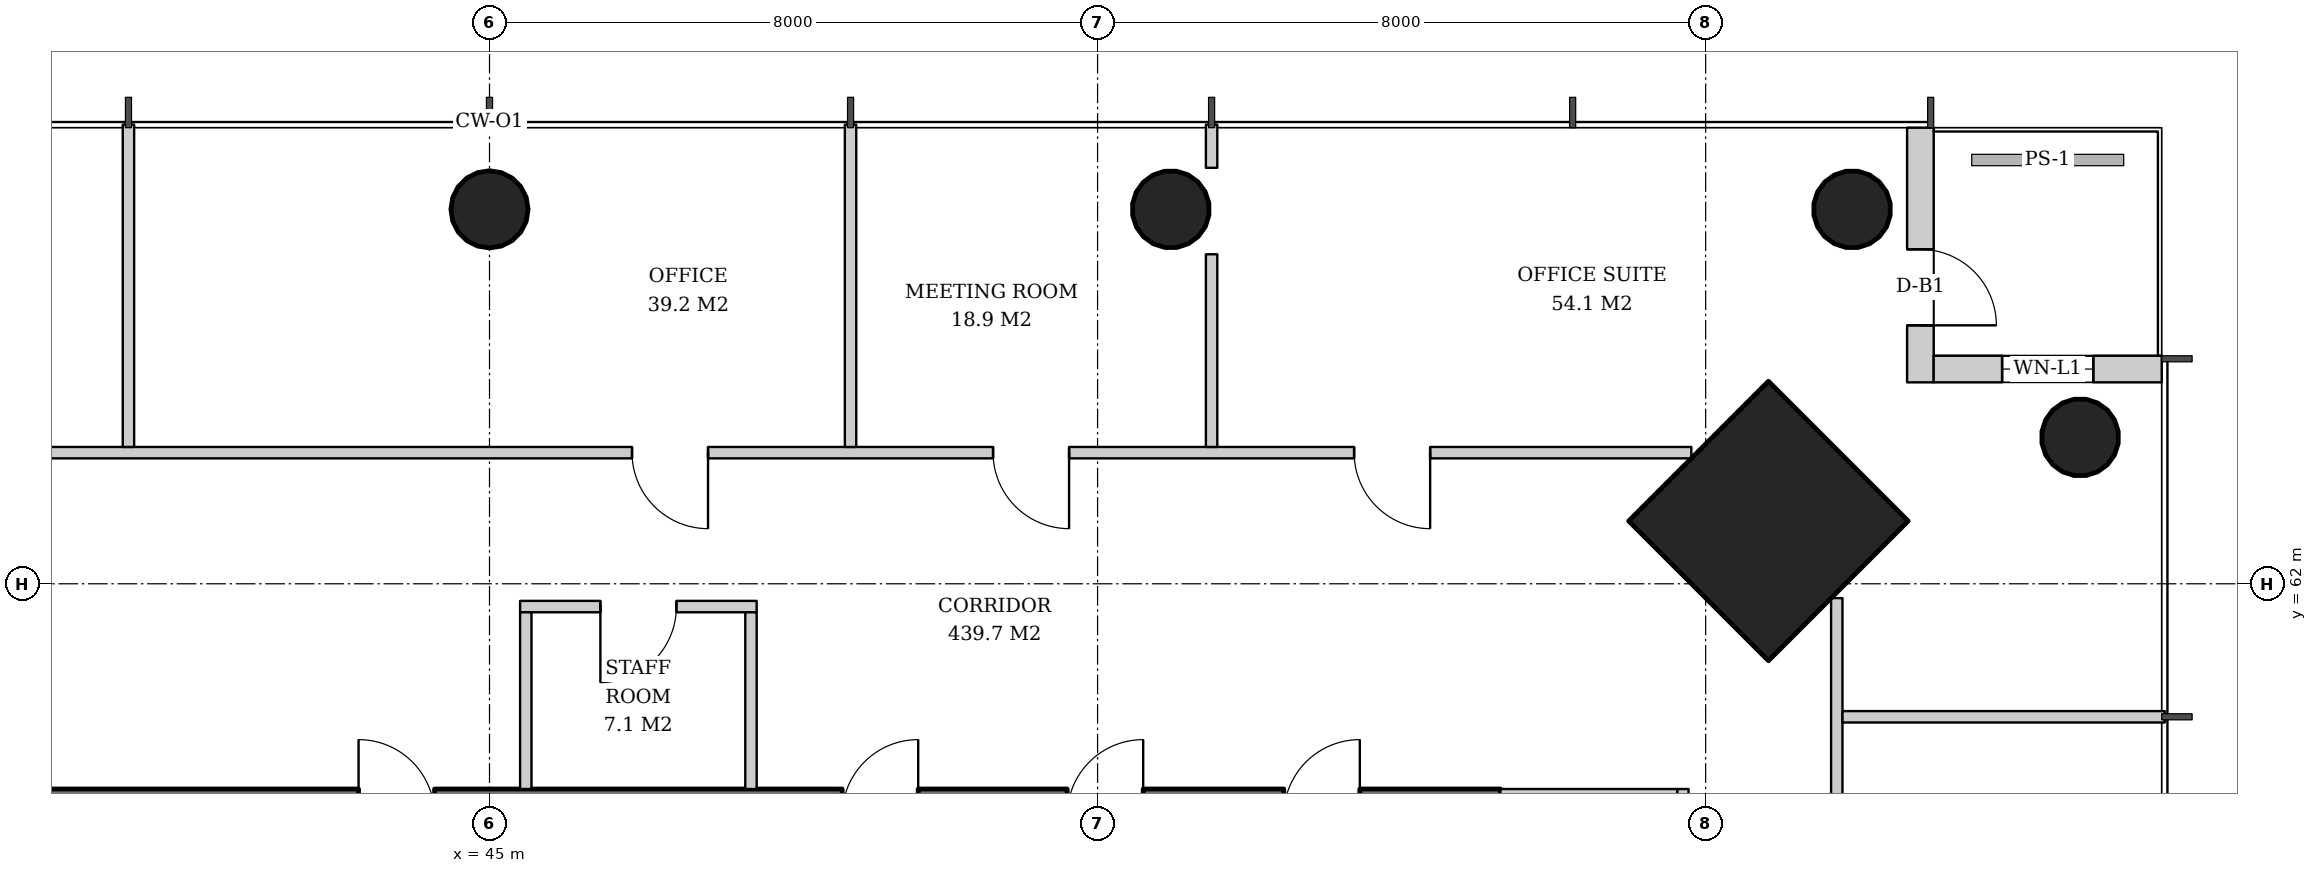
"""IFC4 building model, lengths in metres.
Left out: names, types, materials, properties, quantities, classifications, styles, units other than length and angle.
Written with IfcOpenShell. Run it as: python <this file> out.ifc"""

import sys

from ifc_helpers import new_model, si_unit, direction, frame, frame_2d, origin, origin_2d, place, context, subcontext, project, spatial, rectangle, hollow_circle, extrude, element, fill, save


model = new_model("IFC4")
c1 = context("Model", 3, precision=1e-05, world=origin(), true_north=direction((0.0, 1.0)))
c2 = subcontext(c1, "Body", "Model", "MODEL_VIEW")
j1 = project(units=[si_unit("LENGTHUNIT", "METRE"), si_unit("PLANEANGLEUNIT", "RADIAN")], contexts=[c1])
p1 = place(None, origin())
s1 = spatial("IfcSite", under=j1, at=p1, CompositionType="ELEMENT")
p2 = place(p1, origin())
s2 = spatial("IfcBuilding", under=s1, at=p2, CompositionType="ELEMENT")
p3 = place(p2, frame((0.0, 0.0, 116.0)))
s3 = spatial("IfcBuildingStorey", under=s2, at=p3, CompositionType="ELEMENT", Elevation=116.0)
p4 = place(p3, frame((61.864, 62.864, 0.0), z_axis=(-0.031898107953, -0.031898107953, 0.998981992539), x_axis=(0.707106781187, -0.707106781187, 0.0)))
e1 = element("IfcColumn", 1, at=p4, inside=s3, PredefinedType="COLUMN", context=c2, shape_type="SweptSolid", body=[
    extrude(rectangle(XDim=2.6, YDim=2.6, at=origin_2d()), origin(), (0.0, 0.0, 1.0), 3.804),
])
for number, where, z_axis, x_axis in (
    (2, (65.964, 63.964, 0.0), (-0.032, -0.032, 0.999), (0.707, -0.707, 0.0)),
    (3, (62.964, 66.964, 0.0), (-0.032, -0.032, 0.999), (0.707, -0.707, 0.0)),
):
    element("IfcColumn", number, at=place(p3, frame(where, z_axis=z_axis, x_axis=x_axis)), inside=s3, PredefinedType="COLUMN", context=c2, shape_type="SweptSolid", body=[
        extrude(hollow_circle(Radius=0.508, WallThickness=0.04, at=origin_2d()), origin(), (0.0, 0.0, 1.0), 3.804),
    ])
p5 = place(p3, frame((53.982, 66.964, 0.0), z_axis=(-0.015987204877, -0.031974409754, 0.999360818924), x_axis=(0.894427191, -0.4472135955, 0.0)))
e4 = element("IfcColumn", 4, at=p5, inside=s3, PredefinedType="COLUMN", context=c2, shape_type="SweptSolid", body=[
    extrude(hollow_circle(Radius=0.508, WallThickness=0.04, at=origin_2d()), origin(), (0.0, 0.0, 1.0), 3.802),
])
p6 = place(p3, frame((45.0, 66.964, 0.0), z_axis=(0.0, -0.031978496719, 0.999488557087), x_axis=(1.0, 0.0, 0.0)))
e5 = element("IfcColumn", 5, at=p6, inside=s3, PredefinedType="COLUMN", context=c2, shape_type="SweptSolid", body=[
    extrude(hollow_circle(Radius=0.508, WallThickness=0.04, at=origin_2d()), origin(), (0.0, 0.0, 1.0), 3.802),
])
p7 = place(p3, frame((31.7, 58.95, 0.0), z_axis=(0.0, 0.0, 1.0), x_axis=(1.0, 0.0, 0.0)))
e6 = element("IfcWall", 6, at=p7, inside=s3, PredefinedType="SHEAR", context=c2, shape_type="SweptSolid", body=[
    extrude(rectangle(XDim=26.6, YDim=0.7, at=frame_2d((13.3, 0.0))), origin(), (0.0, 0.0, 1.0), 3.8),
])
p8 = place(p7, frame((17.94, 0.0, 0.0)))
e7 = element("IfcOpeningElement", 7, at=p8, cuts=e6, PredefinedType="OPENING", context=c2, shape_type="SweptSolid", body=[
    extrude(rectangle(XDim=1.0, YDim=2.1, at=frame_2d((0.5, 1.05))), frame((0.0, 0.36, 0.0), z_axis=(0.0, -1.0, 0.0), x_axis=(1.0, 0.0, 0.0)), (0.0, 0.0, 1.0), 0.72),
])
p9 = place(p7, frame((5.825, 0.0, 0.0)))
e8 = element("IfcOpeningElement", 8, at=p9, cuts=e6, PredefinedType="OPENING", context=c2, shape_type="SweptSolid", body=[
    extrude(rectangle(XDim=1.0, YDim=2.1, at=frame_2d((0.5, 1.05))), frame((0.0, 0.36, 0.0), z_axis=(0.0, -1.0, 0.0), x_axis=(1.0, 0.0, 0.0)), (0.0, 0.0, 1.0), 0.72),
])
p10 = place(p7, frame((1.551, 0.0, 0.0)))
e9 = element("IfcOpeningElement", 9, at=p10, cuts=e6, PredefinedType="OPENING", context=c2, shape_type="SweptSolid", body=[
    extrude(rectangle(XDim=1.0, YDim=2.1, at=frame_2d((0.5, 1.05))), frame((0.0, 0.36, 0.0), z_axis=(0.0, -1.0, 0.0), x_axis=(1.0, 0.0, 0.0)), (0.0, 0.0, 1.0), 0.72),
])
p11 = place(p7, frame((3.638, 0.0, 0.0)))
e10 = element("IfcOpeningElement", 10, at=p11, cuts=e6, PredefinedType="OPENING", context=c2, shape_type="SweptSolid", body=[
    extrude(rectangle(XDim=1.0, YDim=2.1, at=frame_2d((0.5, 1.05))), frame((0.0, 0.36, 0.0), z_axis=(0.0, -1.0, 0.0), x_axis=(1.0, 0.0, 0.0)), (0.0, 0.0, 1.0), 0.72),
])
p12 = place(p7, frame((11.577, 0.0, 0.0)))
e11 = element("IfcOpeningElement", 11, at=p12, cuts=e6, PredefinedType="OPENING", context=c2, shape_type="SweptSolid", body=[
    extrude(rectangle(XDim=1.0, YDim=2.1, at=frame_2d((0.5, 1.05))), frame((0.0, 0.36, 0.0), z_axis=(0.0, -1.0, 0.0), x_axis=(1.0, 0.0, 0.0)), (0.0, 0.0, 1.0), 0.72),
])
p13 = place(p7, frame((20.9, 0.0, 0.0)))
e12 = element("IfcOpeningElement", 12, at=p13, cuts=e6, PredefinedType="OPENING", context=c2, shape_type="SweptSolid", body=[
    extrude(rectangle(XDim=1.0, YDim=2.1, at=frame_2d((0.5, 1.05))), frame((0.0, 0.36, 0.0), z_axis=(0.0, -1.0, 0.0), x_axis=(1.0, 0.0, 0.0)), (0.0, 0.0, 1.0), 0.72),
])
p14 = place(p7, frame((23.75, 0.0, 0.0)))
e13 = element("IfcOpeningElement", 13, at=p14, cuts=e6, PredefinedType="OPENING", context=c2, shape_type="SweptSolid", body=[
    extrude(rectangle(XDim=1.0, YDim=2.1, at=frame_2d((0.5, 1.05))), frame((0.0, 0.36, 0.0), z_axis=(0.0, -1.0, 0.0), x_axis=(1.0, 0.0, 0.0)), (0.0, 0.0, 1.0), 0.72),
])
p15 = place(p3, frame((63.825, 68.0, 0.0), z_axis=(0.0, 0.0, 1.0), x_axis=(0.0, -1.0, 0.0)))
e14 = element("IfcWall", 14, at=p15, inside=s3, PredefinedType="SOLIDWALL", context=c2, shape_type="SweptSolid", body=[
    extrude(rectangle(XDim=3.35, YDim=0.35, at=frame_2d((1.675, 0.0))), origin(), (0.0, 0.0, 1.0), 3.62),
])
p16 = place(p15, frame((1.6, 0.0, 0.0)))
e15 = element("IfcOpeningElement", 15, at=p16, cuts=e14, PredefinedType="OPENING", context=c2, shape_type="SweptSolid", body=[
    extrude(rectangle(XDim=1.0, YDim=2.4, at=frame_2d((0.5, 1.2))), frame((0.0, 0.185, 0.0), z_axis=(0.0, -1.0, 0.0), x_axis=(1.0, 0.0, 0.0)), (0.0, 0.0, 1.0), 0.37),
])
p17 = place(p3, frame((64.0, 64.825, 0.0), z_axis=(0.0, 0.0, 1.0), x_axis=(1.0, 0.0, 0.0)))
e16 = element("IfcWall", 16, at=p17, inside=s3, PredefinedType="SOLIDWALL", context=c2, shape_type="SweptSolid", body=[
    extrude(rectangle(XDim=3.0, YDim=0.35, at=frame_2d((1.5, 0.0))), origin(), (0.0, 0.0, 1.0), 3.62),
])
p18 = place(p17, frame((0.9, 0.0, 0.6)))
e17 = element("IfcOpeningElement", 17, at=p18, cuts=e16, PredefinedType="OPENING", context=c2, shape_type="SweptSolid", body=[
    extrude(rectangle(XDim=1.2, YDim=2.55, at=frame_2d((0.6, 1.275))), frame((0.0, 0.185, 0.0), z_axis=(0.0, -1.0, 0.0), x_axis=(1.0, 0.0, 0.0)), (0.0, 0.0, 1.0), 0.37),
])
p19 = place(p3, frame((60.7, 48.025, 0.0), z_axis=(0.0, 0.0, 1.0), x_axis=(0.0, 1.0, 0.0)))
e18 = element("IfcWall", 18, at=p19, inside=s3, PredefinedType="PARTITIONING", context=c2, shape_type="SweptSolid", body=[
    extrude(rectangle(XDim=11.275, YDim=0.15, at=frame_2d((5.638, 0.0))), origin(), (0.0, 0.0, 1.0), 2.806),
])
p20 = place(p19, frame((5.137, 0.0, 0.0)))
e19 = element("IfcOpeningElement", 19, at=p20, cuts=e18, PredefinedType="OPENING", context=c2, shape_type="SweptSolid", body=[
    extrude(rectangle(XDim=1.0, YDim=2.1, at=frame_2d((0.5, 1.05))), frame((0.0, 0.085, 0.0), z_axis=(0.0, -1.0, 0.0), x_axis=(1.0, 0.0, 0.0)), (0.0, 0.0, 1.0), 0.17),
])
p21 = place(p3, frame((58.3, 59.225, 0.0), z_axis=(0.0, 0.0, 1.0), x_axis=(1.0, 0.0, 0.0)))
e20 = element("IfcWall", 20, at=p21, inside=s3, PredefinedType="PARTITIONING", context=c2, shape_type="SweptSolid", body=[
    extrude(rectangle(XDim=2.325, YDim=0.15, at=frame_2d((1.163, 0.0))), origin(), (0.0, 0.0, 1.0), 3.62),
])
p22 = place(p3, frame((48.515, 61.7, 0.0), z_axis=(0.0, 0.0, 1.0), x_axis=(-1.0, 0.0, 0.0)))
e21 = element("IfcWall", 21, at=p22, inside=s3, PredefinedType="PARTITIONING", context=c2, shape_type="SweptSolid", body=[
    extrude(rectangle(XDim=3.112, YDim=0.15, at=frame_2d((1.556, 0.0))), origin(), (0.0, 0.0, 1.0), 2.858),
])
p23 = place(p22, frame((1.056, 0.0, 0.0)))
e22 = element("IfcOpeningElement", 22, at=p23, cuts=e21, PredefinedType="OPENING", context=c2, shape_type="SweptSolid", body=[
    extrude(rectangle(XDim=1.0, YDim=2.1, at=frame_2d((0.5, 1.05))), frame((0.0, 0.085, 0.0), z_axis=(0.0, -1.0, 0.0), x_axis=(1.0, 0.0, 0.0)), (0.0, 0.0, 1.0), 0.17),
])
p24 = place(p3, frame((48.44, 59.3, 0.0), z_axis=(0.0, 0.0, 1.0), x_axis=(0.0, 1.0, 0.0)))
e23 = element("IfcWall", 23, at=p24, inside=s3, PredefinedType="PARTITIONING", context=c2, shape_type="SweptSolid", body=[
    extrude(rectangle(XDim=2.325, YDim=0.15, at=frame_2d((1.163, 0.0))), origin(), (0.0, 0.0, 1.0), 3.62),
])
p25 = place(p3, frame((45.478, 59.3, 0.0), z_axis=(0.0, 0.0, 1.0), x_axis=(0.0, 1.0, 0.0)))
e24 = element("IfcWall", 24, at=p25, inside=s3, PredefinedType="PARTITIONING", context=c2, shape_type="SweptSolid", body=[
    extrude(rectangle(XDim=2.325, YDim=0.15, at=frame_2d((1.163, 0.0))), origin(), (0.0, 0.0, 1.0), 2.858),
])
p26 = place(p3, frame((62.725, 30.188, 0.0), z_axis=(0.0, 0.0, 1.0), x_axis=(0.0, 1.0, 0.0)))
e25 = element("IfcWall", 25, at=p26, inside=s3, PredefinedType="PARTITIONING", context=c2, shape_type="SweptSolid", body=[
    extrude(rectangle(XDim=31.623, YDim=0.15, at=frame_2d((15.812, 0.0))), origin(), (0.0, 0.0, 1.0), 2.72),
])
p27 = place(p26, frame((3.437, 0.0, 0.0)))
e26 = element("IfcOpeningElement", 26, at=p27, cuts=e25, PredefinedType="OPENING", context=c2, shape_type="SweptSolid", body=[
    extrude(rectangle(XDim=1.0, YDim=2.1, at=frame_2d((0.5, 1.05))), frame((0.0, 0.085, 0.0), z_axis=(0.0, -1.0, 0.0), x_axis=(1.0, 0.0, 0.0)), (0.0, 0.0, 1.0), 0.17),
])
p28 = place(p26, frame((8.187, 0.0, 0.0)))
e27 = element("IfcOpeningElement", 27, at=p28, cuts=e25, PredefinedType="OPENING", context=c2, shape_type="SweptSolid", body=[
    extrude(rectangle(XDim=1.0, YDim=2.1, at=frame_2d((0.5, 1.05))), frame((0.0, 0.085, 0.0), z_axis=(0.0, -1.0, 0.0), x_axis=(1.0, 0.0, 0.0)), (0.0, 0.0, 1.0), 0.17),
])
p29 = place(p26, frame((12.937, 0.0, 0.0)))
e28 = element("IfcOpeningElement", 28, at=p29, cuts=e25, PredefinedType="OPENING", context=c2, shape_type="SweptSolid", body=[
    extrude(rectangle(XDim=1.0, YDim=2.1, at=frame_2d((0.5, 1.05))), frame((0.0, 0.085, 0.0), z_axis=(0.0, -1.0, 0.0), x_axis=(1.0, 0.0, 0.0)), (0.0, 0.0, 1.0), 0.17),
])
p30 = place(p26, frame((17.687, 0.0, 0.0)))
e29 = element("IfcOpeningElement", 29, at=p30, cuts=e25, PredefinedType="OPENING", context=c2, shape_type="SweptSolid", body=[
    extrude(rectangle(XDim=1.0, YDim=2.1, at=frame_2d((0.5, 1.05))), frame((0.0, 0.085, 0.0), z_axis=(0.0, -1.0, 0.0), x_axis=(1.0, 0.0, 0.0)), (0.0, 0.0, 1.0), 0.17),
])
p31 = place(p26, frame((22.437, 0.0, 0.0)))
e30 = element("IfcOpeningElement", 30, at=p31, cuts=e25, PredefinedType="OPENING", context=c2, shape_type="SweptSolid", body=[
    extrude(rectangle(XDim=1.0, YDim=2.1, at=frame_2d((0.5, 1.05))), frame((0.0, 0.085, 0.0), z_axis=(0.0, -1.0, 0.0), x_axis=(1.0, 0.0, 0.0)), (0.0, 0.0, 1.0), 0.17),
])
p32 = place(p26, frame((27.187, 0.0, 0.0)))
e31 = element("IfcOpeningElement", 31, at=p32, cuts=e25, PredefinedType="OPENING", context=c2, shape_type="SweptSolid", body=[
    extrude(rectangle(XDim=1.0, YDim=2.1, at=frame_2d((0.5, 1.05))), frame((0.0, 0.085, 0.0), z_axis=(0.0, -1.0, 0.0), x_axis=(1.0, 0.0, 0.0)), (0.0, 0.0, 1.0), 0.17),
])
p33 = place(p3, frame((62.8, 60.25, 0.0), z_axis=(0.0, 0.0, 1.0), x_axis=(1.0, 0.0, 0.0)))
e32 = element("IfcWall", 32, at=p33, inside=s3, PredefinedType="PARTITIONING", context=c2, shape_type="SweptSolid", body=[
    extrude(rectangle(XDim=4.24, YDim=0.15, at=frame_2d((2.12, 0.0))), origin(), (0.0, 0.0, 1.0), 2.82),
])
p34 = place(p3, frame((60.812, 63.725, 0.0), z_axis=(0.0, 0.0, 1.0), x_axis=(-1.0, 0.0, 0.0)))
e33 = element("IfcWall", 33, at=p34, inside=s3, PredefinedType="PARTITIONING", context=c2, shape_type="SweptSolid", body=[
    extrude(rectangle(XDim=31.623, YDim=0.15, at=frame_2d((15.812, 0.0))), origin(), (0.0, 0.0, 1.0), 2.72),
])
p35 = place(p34, frame((3.437, 0.0, 0.0)))
e34 = element("IfcOpeningElement", 34, at=p35, cuts=e33, PredefinedType="OPENING", context=c2, shape_type="SweptSolid", body=[
    extrude(rectangle(XDim=1.0, YDim=2.1, at=frame_2d((0.5, 1.05))), frame((0.0, 0.085, 0.0), z_axis=(0.0, -1.0, 0.0), x_axis=(1.0, 0.0, 0.0)), (0.0, 0.0, 1.0), 0.17),
])
p36 = place(p34, frame((8.187, 0.0, 0.0)))
e35 = element("IfcOpeningElement", 35, at=p36, cuts=e33, PredefinedType="OPENING", context=c2, shape_type="SweptSolid", body=[
    extrude(rectangle(XDim=1.0, YDim=2.1, at=frame_2d((0.5, 1.05))), frame((0.0, 0.085, 0.0), z_axis=(0.0, -1.0, 0.0), x_axis=(1.0, 0.0, 0.0)), (0.0, 0.0, 1.0), 0.17),
])
p37 = place(p34, frame((12.937, 0.0, 0.0)))
e36 = element("IfcOpeningElement", 36, at=p37, cuts=e33, PredefinedType="OPENING", context=c2, shape_type="SweptSolid", body=[
    extrude(rectangle(XDim=1.0, YDim=2.1, at=frame_2d((0.5, 1.05))), frame((0.0, 0.085, 0.0), z_axis=(0.0, -1.0, 0.0), x_axis=(1.0, 0.0, 0.0)), (0.0, 0.0, 1.0), 0.17),
])
p38 = place(p34, frame((22.437, 0.0, 0.0)))
e37 = element("IfcOpeningElement", 37, at=p38, cuts=e33, PredefinedType="OPENING", context=c2, shape_type="SweptSolid", body=[
    extrude(rectangle(XDim=1.0, YDim=2.1, at=frame_2d((0.5, 1.05))), frame((0.0, 0.085, 0.0), z_axis=(0.0, -1.0, 0.0), x_axis=(1.0, 0.0, 0.0)), (0.0, 0.0, 1.0), 0.17),
])
p39 = place(p3, frame((54.5, 63.8, 0.0), z_axis=(0.0, 0.0, 1.0), x_axis=(0.0, 1.0, 0.0)))
e38 = element("IfcWall", 38, at=p39, inside=s3, PredefinedType="PARTITIONING", context=c2, shape_type="SweptSolid", body=[
    extrude(rectangle(XDim=2.535, YDim=0.15, at=frame_2d((1.268, 0.0))), origin(), (0.0, 0.0, 1.0), 3.62),
])
p40 = place(p3, frame((54.5, 67.472, 0.0), z_axis=(0.0, 0.0, 1.0), x_axis=(0.0, 1.0, 0.0)))
e39 = element("IfcWall", 39, at=p40, inside=s3, PredefinedType="PARTITIONING", context=c2, shape_type="SweptSolid", body=[
    extrude(rectangle(XDim=0.568, YDim=0.15, at=frame_2d((0.284, 0.0))), origin(), (0.0, 0.0, 1.0), 3.62),
])
for number, where, z_axis, x_axis in (
    (40, (49.75, 63.8, 0.0), (0.0, 0.0, 1.0), (0.0, 1.0, 0.0)),
    (41, (40.25, 63.8, 0.0), (0.0, 0.0, 1.0), (0.0, 1.0, 0.0)),
):
    element("IfcWall", number, at=place(p3, frame(where, z_axis=z_axis, x_axis=x_axis)), inside=s3, PredefinedType="PARTITIONING", context=c2, shape_type="SweptSolid", body=[
        extrude(rectangle(XDim=4.24, YDim=0.15, at=frame_2d((2.12, 0.0))), origin(), (0.0, 0.0, 1.0), 2.82),
    ])
p41 = place(p16, origin())
e42 = element("IfcDoor", 42, at=p41, inside=s3, OperationType="SINGLE_SWING_RIGHT", PredefinedType="DOOR", context=c2, shape_type="SweptSolid", body=[
    extrude(rectangle(XDim=1.0, YDim=2.4, at=frame_2d((0.5, 1.2))), frame((0.0, 0.025, 0.0), z_axis=(0.0, -1.0, 0.0), x_axis=(1.0, 0.0, 0.0)), (0.0, 0.0, 1.0), 0.05),
])
fill(e15, e42)
p42 = place(p18, origin())
e43 = element("IfcWindow", 43, at=p42, inside=s3, PartitioningType="SINGLE_PANEL", PredefinedType="WINDOW", context=c2, shape_type="SweptSolid", body=[
    extrude(rectangle(XDim=1.2, YDim=2.55, at=frame_2d((0.6, 1.275))), frame((0.0, 0.03, 0.0), z_axis=(0.0, -1.0, 0.0), x_axis=(1.0, 0.0, 0.0)), (0.0, 0.0, 1.0), 0.06),
])
fill(e17, e43)
p43 = place(p23, origin())
e44 = element("IfcDoor", 44, at=p43, inside=s3, OperationType="SINGLE_SWING_RIGHT", PredefinedType="DOOR", context=c2, shape_type="SweptSolid", body=[
    extrude(rectangle(XDim=1.0, YDim=2.1, at=frame_2d((0.5, 1.05))), frame((0.0, 0.025, 0.0), z_axis=(0.0, -1.0, 0.0), x_axis=(1.0, 0.0, 0.0)), (0.0, 0.0, 1.0), 0.05),
])
fill(e22, e44)
p44 = place(p35, origin())
e45 = element("IfcDoor", 45, at=p44, inside=s3, OperationType="SINGLE_SWING_LEFT", PredefinedType="DOOR", context=c2, shape_type="SweptSolid", body=[
    extrude(rectangle(XDim=1.0, YDim=2.1, at=frame_2d((0.5, 1.05))), frame((0.0, 0.025, 0.0), z_axis=(0.0, -1.0, 0.0), x_axis=(1.0, 0.0, 0.0)), (0.0, 0.0, 1.0), 0.05),
])
fill(e34, e45)
p45 = place(p36, origin())
e46 = element("IfcDoor", 46, at=p45, inside=s3, OperationType="SINGLE_SWING_LEFT", PredefinedType="DOOR", context=c2, shape_type="SweptSolid", body=[
    extrude(rectangle(XDim=1.0, YDim=2.1, at=frame_2d((0.5, 1.05))), frame((0.0, 0.025, 0.0), z_axis=(0.0, -1.0, 0.0), x_axis=(1.0, 0.0, 0.0)), (0.0, 0.0, 1.0), 0.05),
])
fill(e35, e46)
p46 = place(p37, origin())
e47 = element("IfcDoor", 47, at=p46, inside=s3, OperationType="SINGLE_SWING_LEFT", PredefinedType="DOOR", context=c2, shape_type="SweptSolid", body=[
    extrude(rectangle(XDim=1.0, YDim=2.1, at=frame_2d((0.5, 1.05))), frame((0.0, 0.025, 0.0), z_axis=(0.0, -1.0, 0.0), x_axis=(1.0, 0.0, 0.0)), (0.0, 0.0, 1.0), 0.05),
])
fill(e36, e47)
save(model, sys.argv[1])
